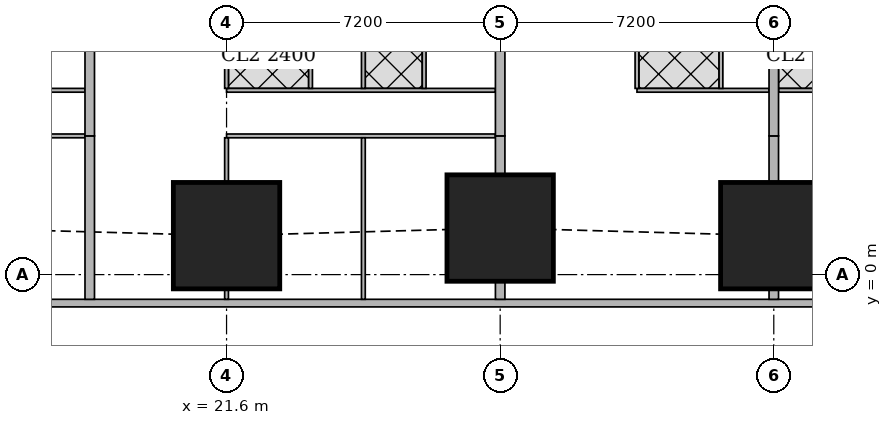
"""IFC4 building model, lengths in metres.
Left out: names, types, materials, properties, quantities, classifications, styles, units other than length and angle.
Written with IfcOpenShell. Run it as: python <this file> out.ifc"""

import sys

from ifc_helpers import new_model, si_unit, direction, frame, frame_2d, origin, origin_2d, place, context, subcontext, project, spatial, rectangle, extrude, element, fill, save


model = new_model("IFC4")
c1 = context("Model", 3, precision=1e-05, world=origin(), true_north=direction((0.0, 1.0)))
c2 = subcontext(c1, "Body", "Model", "MODEL_VIEW")
j1 = project(units=[si_unit("LENGTHUNIT", "METRE"), si_unit("PLANEANGLEUNIT", "RADIAN")], contexts=[c1])
p1 = place(None, origin())
s1 = spatial("IfcSite", under=j1, at=p1, CompositionType="ELEMENT")
p2 = place(p1, origin())
s2 = spatial("IfcBuilding", under=s1, at=p2, CompositionType="ELEMENT")
p3 = place(p2, frame((0.0, 0.0, 53.75)))
s3 = spatial("IfcBuildingStorey", under=s2, at=p3, CompositionType="ELEMENT", Elevation=53.75)
for number, where, z_axis, x_axis in (
    (1, (21.6, 1.025, 0.0), (0.0, 0.0, 1.0), (1.0, 0.0, 0.0)),
    (2, (28.8, 1.225, 0.0), (0.0, 0.0, 1.0), (1.0, 0.0, 0.0)),
    (3, (36.0, 1.025, 0.0), (0.0, 0.0, 1.0), (1.0, 0.0, 0.0)),
):
    element("IfcColumn", number, at=place(p3, frame(where, z_axis=z_axis, x_axis=x_axis)), inside=s3, PredefinedType="COLUMN", context=c2, shape_type="SweptSolid", body=[
        extrude(rectangle(XDim=2.8, YDim=2.8, at=origin_2d()), origin(), (0.0, 0.0, 1.0), 3.75),
    ])
p4 = place(p3, frame((2.163, -0.75, 0.0), z_axis=(0.0, 0.0, 1.0), x_axis=(1.0, 0.0, 0.0)))
e4 = element("IfcWall", 4, at=p4, inside=s3, PredefinedType="SOLIDWALL", context=c2, shape_type="SweptSolid", body=[
    extrude(rectangle(XDim=45.628, YDim=0.2, at=frame_2d((22.814, 0.0))), origin(), (0.0, 0.0, 1.0), 3.5),
])
p5 = place(p4, frame((9.537, 0.0, 0.9)))
e5 = element("IfcOpeningElement", 5, at=p5, cuts=e4, PredefinedType="OPENING", context=c2, shape_type="SweptSolid", body=[
    extrude(rectangle(XDim=1.8, YDim=1.5, at=frame_2d((0.9, 0.75))), frame((0.0, 0.11, 0.0), z_axis=(0.0, -1.0, 0.0), x_axis=(1.0, 0.0, 0.0)), (0.0, 0.0, 1.0), 0.22),
])
p6 = place(p4, frame((13.137, 0.0, 0.9)))
e6 = element("IfcOpeningElement", 6, at=p6, cuts=e4, PredefinedType="OPENING", context=c2, shape_type="SweptSolid", body=[
    extrude(rectangle(XDim=1.8, YDim=1.5, at=frame_2d((0.9, 0.75))), frame((0.0, 0.11, 0.0), z_axis=(0.0, -1.0, 0.0), x_axis=(1.0, 0.0, 0.0)), (0.0, 0.0, 1.0), 0.22),
])
p7 = place(p4, frame((16.737, 0.0, 0.9)))
e7 = element("IfcOpeningElement", 7, at=p7, cuts=e4, PredefinedType="OPENING", context=c2, shape_type="SweptSolid", body=[
    extrude(rectangle(XDim=1.8, YDim=1.5, at=frame_2d((0.9, 0.75))), frame((0.0, 0.11, 0.0), z_axis=(0.0, -1.0, 0.0), x_axis=(1.0, 0.0, 0.0)), (0.0, 0.0, 1.0), 0.22),
])
p8 = place(p4, frame((20.337, 0.0, 0.9)))
e8 = element("IfcOpeningElement", 8, at=p8, cuts=e4, PredefinedType="OPENING", context=c2, shape_type="SweptSolid", body=[
    extrude(rectangle(XDim=1.8, YDim=1.5, at=frame_2d((0.9, 0.75))), frame((0.0, 0.11, 0.0), z_axis=(0.0, -1.0, 0.0), x_axis=(1.0, 0.0, 0.0)), (0.0, 0.0, 1.0), 0.22),
])
p9 = place(p4, frame((23.937, 0.0, 0.9)))
e9 = element("IfcOpeningElement", 9, at=p9, cuts=e4, PredefinedType="OPENING", context=c2, shape_type="SweptSolid", body=[
    extrude(rectangle(XDim=1.8, YDim=1.5, at=frame_2d((0.9, 0.75))), frame((0.0, 0.11, 0.0), z_axis=(0.0, -1.0, 0.0), x_axis=(1.0, 0.0, 0.0)), (0.0, 0.0, 1.0), 0.22),
])
p10 = place(p4, frame((27.537, 0.0, 0.9)))
e10 = element("IfcOpeningElement", 10, at=p10, cuts=e4, PredefinedType="OPENING", context=c2, shape_type="SweptSolid", body=[
    extrude(rectangle(XDim=1.8, YDim=1.5, at=frame_2d((0.9, 0.75))), frame((0.0, 0.11, 0.0), z_axis=(0.0, -1.0, 0.0), x_axis=(1.0, 0.0, 0.0)), (0.0, 0.0, 1.0), 0.22),
])
p11 = place(p4, frame((31.137, 0.0, 0.9)))
e11 = element("IfcOpeningElement", 11, at=p11, cuts=e4, PredefinedType="OPENING", context=c2, shape_type="SweptSolid", body=[
    extrude(rectangle(XDim=1.8, YDim=1.5, at=frame_2d((0.9, 0.75))), frame((0.0, 0.11, 0.0), z_axis=(0.0, -1.0, 0.0), x_axis=(1.0, 0.0, 0.0)), (0.0, 0.0, 1.0), 0.22),
])
p12 = place(p4, frame((34.737, 0.0, 0.9)))
e12 = element("IfcOpeningElement", 12, at=p12, cuts=e4, PredefinedType="OPENING", context=c2, shape_type="SweptSolid", body=[
    extrude(rectangle(XDim=1.8, YDim=1.5, at=frame_2d((0.9, 0.75))), frame((0.0, 0.11, 0.0), z_axis=(0.0, -1.0, 0.0), x_axis=(1.0, 0.0, 0.0)), (0.0, 0.0, 1.0), 0.22),
])
p13 = place(p3, frame((35.094, 36.585, 0.0), z_axis=(0.0, 0.0, 1.0), x_axis=(0.185588860311, -0.982627485331, 0.0)))
e13 = element("IfcWall", 13, at=p13, inside=s3, PredefinedType="SOLIDWALL", context=c2, shape_type="SweptSolid", body=[
    extrude(rectangle(XDim=34.797, YDim=0.15, at=frame_2d((17.399, 0.0))), origin(), (0.0, 0.0, 1.0), 2.5),
])
p14 = place(p13, frame((9.828, 0.0, 0.0)))
e14 = element("IfcOpeningElement", 14, at=p14, cuts=e13, PredefinedType="OPENING", context=c2, shape_type="SweptSolid", body=[
    extrude(rectangle(XDim=1.0, YDim=2.1, at=frame_2d((0.5, 1.05))), frame((0.0, 0.085, 0.0), z_axis=(0.0, -1.0, 0.0), x_axis=(1.0, 0.0, 0.0)), (0.0, 0.0, 1.0), 0.17),
])
p15 = place(p13, frame((13.645, 0.0, 0.0)))
e15 = element("IfcOpeningElement", 15, at=p15, cuts=e13, PredefinedType="OPENING", context=c2, shape_type="SweptSolid", body=[
    extrude(rectangle(XDim=1.0, YDim=2.1, at=frame_2d((0.5, 1.05))), frame((0.0, 0.085, 0.0), z_axis=(0.0, -1.0, 0.0), x_axis=(1.0, 0.0, 0.0)), (0.0, 0.0, 1.0), 0.17),
])
p16 = place(p13, frame((25.9, 0.0, 0.0)))
e16 = element("IfcOpeningElement", 16, at=p16, cuts=e13, PredefinedType="OPENING", context=c2, shape_type="SweptSolid", body=[
    extrude(rectangle(XDim=1.0, YDim=2.1, at=frame_2d((0.5, 1.05))), frame((0.0, 0.085, 0.0), z_axis=(0.0, -1.0, 0.0), x_axis=(1.0, 0.0, 0.0)), (0.0, 0.0, 1.0), 0.17),
])
p17 = place(p3, frame((17.875, 3.65, 0.0), z_axis=(0.0, 0.0, 1.0), x_axis=(-1.0, 0.0, 0.0)))
e17 = element("IfcWall", 17, at=p17, inside=s3, PredefinedType="PARTITIONING", context=c2, shape_type="SweptSolid", body=[
    extrude(rectangle(XDim=3.475, YDim=0.1, at=frame_2d((1.738, 0.0))), origin(), (0.0, 0.0, 1.0), 3.5),
])
p18 = place(p17, frame((1.15, 0.0, 0.0)))
e18 = element("IfcOpeningElement", 18, at=p18, cuts=e17, PredefinedType="OPENING", context=c2, shape_type="SweptSolid", body=[
    extrude(rectangle(XDim=0.9, YDim=2.1, at=frame_2d((0.45, 1.05))), frame((0.0, 0.06, 0.0), z_axis=(0.0, -1.0, 0.0), x_axis=(1.0, 0.0, 0.0)), (0.0, 0.0, 1.0), 0.12),
])
p19 = place(p3, frame((17.875, 4.85, 0.0), z_axis=(0.0, 0.0, 1.0), x_axis=(-1.0, 0.0, 0.0)))
e19 = element("IfcWall", 19, at=p19, inside=s3, PredefinedType="PARTITIONING", context=c2, shape_type="SweptSolid", body=[
    extrude(rectangle(XDim=3.475, YDim=0.1, at=frame_2d((1.738, 0.0))), origin(), (0.0, 0.0, 1.0), 3.5),
])
p20 = place(p19, frame((1.92, 0.0, 0.0)))
e20 = element("IfcOpeningElement", 20, at=p20, cuts=e19, PredefinedType="OPENING", context=c2, shape_type="SweptSolid", body=[
    extrude(rectangle(XDim=0.9, YDim=2.1, at=frame_2d((0.45, 1.05))), frame((0.0, 0.06, 0.0), z_axis=(0.0, -1.0, 0.0), x_axis=(1.0, 0.0, 0.0)), (0.0, 0.0, 1.0), 0.12),
])
p21 = place(p19, frame((0.15, 0.0, 0.0)))
e21 = element("IfcOpeningElement", 21, at=p21, cuts=e19, PredefinedType="OPENING", context=c2, shape_type="SweptSolid", body=[
    extrude(rectangle(XDim=0.9, YDim=2.1, at=frame_2d((0.45, 1.05))), frame((0.0, 0.06, 0.0), z_axis=(0.0, -1.0, 0.0), x_axis=(1.0, 0.0, 0.0)), (0.0, 0.0, 1.0), 0.12),
])
p22 = place(p3, frame((28.675, 3.65, 0.0), z_axis=(0.0, 0.0, 1.0), x_axis=(-1.0, 0.0, 0.0)))
e22 = element("IfcWall", 22, at=p22, inside=s3, PredefinedType="PARTITIONING", context=c2, shape_type="SweptSolid", body=[
    extrude(rectangle(XDim=7.075, YDim=0.1, at=frame_2d((3.538, 0.0))), origin(), (0.0, 0.0, 1.0), 3.5),
])
p23 = place(p22, frame((4.75, 0.0, 0.0)))
e23 = element("IfcOpeningElement", 23, at=p23, cuts=e22, PredefinedType="OPENING", context=c2, shape_type="SweptSolid", body=[
    extrude(rectangle(XDim=0.9, YDim=2.1, at=frame_2d((0.45, 1.05))), frame((0.0, 0.06, 0.0), z_axis=(0.0, -1.0, 0.0), x_axis=(1.0, 0.0, 0.0)), (0.0, 0.0, 1.0), 0.12),
])
p24 = place(p22, frame((2.375, 0.0, 0.0)))
e24 = element("IfcOpeningElement", 24, at=p24, cuts=e22, PredefinedType="OPENING", context=c2, shape_type="SweptSolid", body=[
    extrude(rectangle(XDim=0.9, YDim=2.1, at=frame_2d((0.45, 1.05))), frame((0.0, 0.06, 0.0), z_axis=(0.0, -1.0, 0.0), x_axis=(1.0, 0.0, 0.0)), (0.0, 0.0, 1.0), 0.12),
])
p25 = place(p3, frame((28.675, 4.85, 0.0), z_axis=(0.0, 0.0, 1.0), x_axis=(-1.0, 0.0, 0.0)))
e25 = element("IfcWall", 25, at=p25, inside=s3, PredefinedType="PARTITIONING", context=c2, shape_type="SweptSolid", body=[
    extrude(rectangle(XDim=7.075, YDim=0.1, at=frame_2d((3.538, 0.0))), origin(), (0.0, 0.0, 1.0), 3.5),
])
p26 = place(p25, frame((5.52, 0.0, 0.0)))
e26 = element("IfcOpeningElement", 26, at=p26, cuts=e25, PredefinedType="OPENING", context=c2, shape_type="SweptSolid", body=[
    extrude(rectangle(XDim=0.9, YDim=2.1, at=frame_2d((0.45, 1.05))), frame((0.0, 0.06, 0.0), z_axis=(0.0, -1.0, 0.0), x_axis=(1.0, 0.0, 0.0)), (0.0, 0.0, 1.0), 0.12),
])
p27 = place(p25, frame((2.225, 0.0, 0.0)))
e27 = element("IfcOpeningElement", 27, at=p27, cuts=e25, PredefinedType="OPENING", context=c2, shape_type="SweptSolid", body=[
    extrude(rectangle(XDim=0.9, YDim=2.1, at=frame_2d((0.45, 1.05))), frame((0.0, 0.06, 0.0), z_axis=(0.0, -1.0, 0.0), x_axis=(1.0, 0.0, 0.0)), (0.0, 0.0, 1.0), 0.12),
])
p28 = place(p25, frame((3.72, 0.0, 0.0)))
e28 = element("IfcOpeningElement", 28, at=p28, cuts=e25, PredefinedType="OPENING", context=c2, shape_type="SweptSolid", body=[
    extrude(rectangle(XDim=0.9, YDim=2.1, at=frame_2d((0.45, 1.05))), frame((0.0, 0.06, 0.0), z_axis=(0.0, -1.0, 0.0), x_axis=(1.0, 0.0, 0.0)), (0.0, 0.0, 1.0), 0.12),
])
p29 = place(p25, frame((0.425, 0.0, 0.0)))
e29 = element("IfcOpeningElement", 29, at=p29, cuts=e25, PredefinedType="OPENING", context=c2, shape_type="SweptSolid", body=[
    extrude(rectangle(XDim=0.9, YDim=2.1, at=frame_2d((0.45, 1.05))), frame((0.0, 0.06, 0.0), z_axis=(0.0, -1.0, 0.0), x_axis=(1.0, 0.0, 0.0)), (0.0, 0.0, 1.0), 0.12),
])
p30 = place(p3, frame((21.6, -0.65, 0.0), z_axis=(0.0, 0.0, 1.0), x_axis=(0.0, 1.0, 0.0)))
e30 = element("IfcWall", 30, at=p30, inside=s3, PredefinedType="PARTITIONING", context=c2, shape_type="SweptSolid", body=[
    extrude(rectangle(XDim=0.274, YDim=0.1, at=frame_2d((0.137, 0.0))), origin(), (0.0, 0.0, 1.0), 3.5),
])
p31 = place(p3, frame((21.6, 2.426, 0.0), z_axis=(0.0, 0.0, 1.0), x_axis=(0.0, 1.0, 0.0)))
e31 = element("IfcWall", 31, at=p31, inside=s3, PredefinedType="PARTITIONING", context=c2, shape_type="SweptSolid", body=[
    extrude(rectangle(XDim=1.174, YDim=0.1, at=frame_2d((0.587, 0.0))), origin(), (0.0, 0.0, 1.0), 3.5),
])
p32 = place(p3, frame((25.2, -0.65, 0.0), z_axis=(0.0, 0.0, 1.0), x_axis=(0.0, 1.0, 0.0)))
e32 = element("IfcWall", 32, at=p32, inside=s3, PredefinedType="PARTITIONING", context=c2, shape_type="SweptSolid", body=[
    extrude(rectangle(XDim=4.25, YDim=0.1, at=frame_2d((2.125, 0.0))), origin(), (0.0, 0.0, 1.0), 2.05),
])
p33 = place(p3, frame((21.6, 4.9, 0.0), z_axis=(0.0, 0.0, 1.0), x_axis=(0.0, 1.0, 0.0)))
e33 = element("IfcWall", 33, at=p33, inside=s3, PredefinedType="PARTITIONING", context=c2, shape_type="SweptSolid", body=[
    extrude(rectangle(XDim=1.699, YDim=0.1, at=frame_2d((0.85, 0.0))), origin(), (0.0, 0.0, 1.0), 3.5),
])
for number, where, z_axis, x_axis in (
    (34, (25.2, 4.9, 0.0), (0.0, 0.0, 1.0), (0.0, 1.0, 0.0)),
    (35, (23.81, 4.9, 0.0), (0.0, 0.0, 1.0), (0.0, 1.0, 0.0)),
    (36, (26.8, 4.9, 0.0), (0.0, 0.0, 1.0), (0.0, 1.0, 0.0)),
):
    element("IfcWall", number, at=place(p3, frame(where, z_axis=z_axis, x_axis=x_axis)), inside=s3, PredefinedType="PARTITIONING", context=c2, shape_type="SweptSolid", body=[
        extrude(rectangle(XDim=3.275, YDim=0.1, at=frame_2d((1.638, 0.0))), origin(), (0.0, 0.0, 1.0), 3.5),
    ])
p34 = place(p3, frame((18.0, -0.65, 0.0), z_axis=(0.0, 0.0, 1.0), x_axis=(0.0, 1.0, 0.0)))
e37 = element("IfcWall", 37, at=p34, inside=s3, PredefinedType="SOLIDWALL", context=c2, shape_type="SweptSolid", body=[
    extrude(rectangle(XDim=4.3, YDim=0.25, at=frame_2d((2.15, 0.0))), origin(), (0.0, 0.0, 1.0), 2.05),
])
p35 = place(p3, frame((18.0, 3.65, 0.0), z_axis=(0.0, 0.0, 1.0), x_axis=(0.0, 1.0, 0.0)))
e38 = element("IfcWall", 38, at=p35, inside=s3, PredefinedType="SOLIDWALL", context=c2, shape_type="SweptSolid", body=[
    extrude(rectangle(XDim=4.525, YDim=0.25, at=frame_2d((2.263, 0.0))), origin(), (0.0, 0.0, 1.0), 3.5),
])
p36 = place(p3, frame((35.875, 4.85, 0.0), z_axis=(0.0, 0.0, 1.0), x_axis=(-1.0, 0.0, 0.0)))
e39 = element("IfcWall", 39, at=p36, inside=s3, PredefinedType="PARTITIONING", context=c2, shape_type="SweptSolid", body=[
    extrude(rectangle(XDim=3.475, YDim=0.1, at=frame_2d((1.738, 0.0))), origin(), (0.0, 0.0, 1.0), 3.5),
])
p37 = place(p36, frame((1.92, 0.0, 0.0)))
e40 = element("IfcOpeningElement", 40, at=p37, cuts=e39, PredefinedType="OPENING", context=c2, shape_type="SweptSolid", body=[
    extrude(rectangle(XDim=0.9, YDim=2.1, at=frame_2d((0.45, 1.05))), frame((0.0, 0.06, 0.0), z_axis=(0.0, -1.0, 0.0), x_axis=(1.0, 0.0, 0.0)), (0.0, 0.0, 1.0), 0.12),
])
p38 = place(p36, frame((0.15, 0.0, 0.0)))
e41 = element("IfcOpeningElement", 41, at=p38, cuts=e39, PredefinedType="OPENING", context=c2, shape_type="SweptSolid", body=[
    extrude(rectangle(XDim=0.9, YDim=2.1, at=frame_2d((0.45, 1.05))), frame((0.0, 0.06, 0.0), z_axis=(0.0, -1.0, 0.0), x_axis=(1.0, 0.0, 0.0)), (0.0, 0.0, 1.0), 0.12),
])
for number, where, z_axis, x_axis in (
    (42, (32.4, 4.9, 0.0), (0.0, 0.0, 1.0), (0.0, 1.0, 0.0)),
    (43, (34.61, 4.9, 0.0), (0.0, 0.0, 1.0), (0.0, 1.0, 0.0)),
):
    element("IfcWall", number, at=place(p3, frame(where, z_axis=z_axis, x_axis=x_axis)), inside=s3, PredefinedType="PARTITIONING", context=c2, shape_type="SweptSolid", body=[
        extrude(rectangle(XDim=3.275, YDim=0.1, at=frame_2d((1.638, 0.0))), origin(), (0.0, 0.0, 1.0), 3.5),
    ])
p39 = place(p3, frame((28.8, -0.65, 0.0), z_axis=(0.0, 0.0, 1.0), x_axis=(0.0, 1.0, 0.0)))
e44 = element("IfcWall", 44, at=p39, inside=s3, PredefinedType="SOLIDWALL", context=c2, shape_type="SweptSolid", body=[
    extrude(rectangle(XDim=0.474, YDim=0.25, at=frame_2d((0.237, 0.0))), origin(), (0.0, 0.0, 1.0), 3.5),
])
p40 = place(p3, frame((28.8, 2.626, 0.0), z_axis=(0.0, 0.0, 1.0), x_axis=(0.0, 1.0, 0.0)))
e45 = element("IfcWall", 45, at=p40, inside=s3, PredefinedType="SOLIDWALL", context=c2, shape_type="SweptSolid", body=[
    extrude(rectangle(XDim=1.024, YDim=0.25, at=frame_2d((0.512, 0.0))), origin(), (0.0, 0.0, 1.0), 3.5),
])
p41 = place(p3, frame((28.8, 3.65, 0.0), z_axis=(0.0, 0.0, 1.0), x_axis=(0.0, 1.0, 0.0)))
e46 = element("IfcWall", 46, at=p41, inside=s3, PredefinedType="SOLIDWALL", context=c2, shape_type="SweptSolid", body=[
    extrude(rectangle(XDim=2.949, YDim=0.25, at=frame_2d((1.475, 0.0))), origin(), (0.0, 0.0, 1.0), 3.5),
])
p42 = place(p3, frame((38.029, 4.85, 0.0), z_axis=(0.0, 0.0, 1.0), x_axis=(-1.0, 0.0, 0.0)))
e47 = element("IfcWall", 47, at=p42, inside=s3, PredefinedType="PARTITIONING", context=c2, shape_type="SweptSolid", body=[
    extrude(rectangle(XDim=1.904, YDim=0.1, at=frame_2d((0.952, 0.0))), origin(), (0.0, 0.0, 1.0), 3.5),
])
p43 = place(p42, frame((0.579, 0.0, 0.0)))
e48 = element("IfcOpeningElement", 48, at=p43, cuts=e47, PredefinedType="OPENING", context=c2, shape_type="SweptSolid", body=[
    extrude(rectangle(XDim=0.9, YDim=2.1, at=frame_2d((0.45, 1.05))), frame((0.0, 0.06, 0.0), z_axis=(0.0, -1.0, 0.0), x_axis=(1.0, 0.0, 0.0)), (0.0, 0.0, 1.0), 0.12),
])
p44 = place(p3, frame((36.0, -0.65, 0.0), z_axis=(0.0, 0.0, 1.0), x_axis=(0.0, 1.0, 0.0)))
e49 = element("IfcWall", 49, at=p44, inside=s3, PredefinedType="SOLIDWALL", context=c2, shape_type="SweptSolid", body=[
    extrude(rectangle(XDim=0.274, YDim=0.25, at=frame_2d((0.137, 0.0))), origin(), (0.0, 0.0, 1.0), 3.5),
])
p45 = place(p3, frame((36.0, 2.426, 0.0), z_axis=(0.0, 0.0, 1.0), x_axis=(0.0, 1.0, 0.0)))
e50 = element("IfcWall", 50, at=p45, inside=s3, PredefinedType="SOLIDWALL", context=c2, shape_type="SweptSolid", body=[
    extrude(rectangle(XDim=1.224, YDim=0.25, at=frame_2d((0.612, 0.0))), origin(), (0.0, 0.0, 1.0), 3.5),
])
p46 = place(p3, frame((36.0, 3.65, 0.0), z_axis=(0.0, 0.0, 1.0), x_axis=(0.0, 1.0, 0.0)))
e51 = element("IfcWall", 51, at=p46, inside=s3, PredefinedType="SOLIDWALL", context=c2, shape_type="SweptSolid", body=[
    extrude(rectangle(XDim=2.949, YDim=0.25, at=frame_2d((1.475, 0.0))), origin(), (0.0, 0.0, 1.0), 3.5),
])
p47 = place(p6, origin())
e52 = element("IfcWindow", 52, at=p47, inside=s3, PartitioningType="SINGLE_PANEL", PredefinedType="WINDOW", context=c2, shape_type="SweptSolid", body=[
    extrude(rectangle(XDim=1.8, YDim=1.5, at=frame_2d((0.9, 0.75))), frame((0.0, 0.03, 0.0), z_axis=(0.0, -1.0, 0.0), x_axis=(1.0, 0.0, 0.0)), (0.0, 0.0, 1.0), 0.06),
])
fill(e6, e52)
p48 = place(p7, origin())
e53 = element("IfcWindow", 53, at=p48, inside=s3, PartitioningType="SINGLE_PANEL", PredefinedType="WINDOW", context=c2, shape_type="SweptSolid", body=[
    extrude(rectangle(XDim=1.8, YDim=1.5, at=frame_2d((0.9, 0.75))), frame((0.0, 0.03, 0.0), z_axis=(0.0, -1.0, 0.0), x_axis=(1.0, 0.0, 0.0)), (0.0, 0.0, 1.0), 0.06),
])
fill(e7, e53)
p49 = place(p8, origin())
e54 = element("IfcWindow", 54, at=p49, inside=s3, PartitioningType="SINGLE_PANEL", PredefinedType="WINDOW", context=c2, shape_type="SweptSolid", body=[
    extrude(rectangle(XDim=1.8, YDim=1.5, at=frame_2d((0.9, 0.75))), frame((0.0, 0.03, 0.0), z_axis=(0.0, -1.0, 0.0), x_axis=(1.0, 0.0, 0.0)), (0.0, 0.0, 1.0), 0.06),
])
fill(e8, e54)
p50 = place(p9, origin())
e55 = element("IfcWindow", 55, at=p50, inside=s3, PartitioningType="SINGLE_PANEL", PredefinedType="WINDOW", context=c2, shape_type="SweptSolid", body=[
    extrude(rectangle(XDim=1.8, YDim=1.5, at=frame_2d((0.9, 0.75))), frame((0.0, 0.03, 0.0), z_axis=(0.0, -1.0, 0.0), x_axis=(1.0, 0.0, 0.0)), (0.0, 0.0, 1.0), 0.06),
])
fill(e9, e55)
p51 = place(p10, origin())
e56 = element("IfcWindow", 56, at=p51, inside=s3, PartitioningType="SINGLE_PANEL", PredefinedType="WINDOW", context=c2, shape_type="SweptSolid", body=[
    extrude(rectangle(XDim=1.8, YDim=1.5, at=frame_2d((0.9, 0.75))), frame((0.0, 0.03, 0.0), z_axis=(0.0, -1.0, 0.0), x_axis=(1.0, 0.0, 0.0)), (0.0, 0.0, 1.0), 0.06),
])
fill(e10, e56)
p52 = place(p11, origin())
e57 = element("IfcWindow", 57, at=p52, inside=s3, PartitioningType="SINGLE_PANEL", PredefinedType="WINDOW", context=c2, shape_type="SweptSolid", body=[
    extrude(rectangle(XDim=1.8, YDim=1.5, at=frame_2d((0.9, 0.75))), frame((0.0, 0.03, 0.0), z_axis=(0.0, -1.0, 0.0), x_axis=(1.0, 0.0, 0.0)), (0.0, 0.0, 1.0), 0.06),
])
fill(e11, e57)
p53 = place(p12, origin())
e58 = element("IfcWindow", 58, at=p53, inside=s3, PartitioningType="SINGLE_PANEL", PredefinedType="WINDOW", context=c2, shape_type="SweptSolid", body=[
    extrude(rectangle(XDim=1.8, YDim=1.5, at=frame_2d((0.9, 0.75))), frame((0.0, 0.03, 0.0), z_axis=(0.0, -1.0, 0.0), x_axis=(1.0, 0.0, 0.0)), (0.0, 0.0, 1.0), 0.06),
])
fill(e12, e58)
p54 = place(p21, origin())
e59 = element("IfcDoor", 59, at=p54, inside=s3, OperationType="SINGLE_SWING_RIGHT", PredefinedType="DOOR", context=c2, shape_type="SweptSolid", body=[
    extrude(rectangle(XDim=0.9, YDim=2.1, at=frame_2d((0.45, 1.05))), frame((0.0, 0.025, 0.0), z_axis=(0.0, -1.0, 0.0), x_axis=(1.0, 0.0, 0.0)), (0.0, 0.0, 1.0), 0.05),
])
fill(e21, e59)
p55 = place(p23, origin())
e60 = element("IfcDoor", 60, at=p55, inside=s3, OperationType="SINGLE_SWING_RIGHT", PredefinedType="DOOR", context=c2, shape_type="SweptSolid", body=[
    extrude(rectangle(XDim=0.9, YDim=2.1, at=frame_2d((0.45, 1.05))), frame((0.0, 0.025, 0.0), z_axis=(0.0, -1.0, 0.0), x_axis=(1.0, 0.0, 0.0)), (0.0, 0.0, 1.0), 0.05),
])
fill(e23, e60)
p56 = place(p24, origin())
e61 = element("IfcDoor", 61, at=p56, inside=s3, OperationType="SINGLE_SWING_RIGHT", PredefinedType="DOOR", context=c2, shape_type="SweptSolid", body=[
    extrude(rectangle(XDim=0.9, YDim=2.1, at=frame_2d((0.45, 1.05))), frame((0.0, 0.025, 0.0), z_axis=(0.0, -1.0, 0.0), x_axis=(1.0, 0.0, 0.0)), (0.0, 0.0, 1.0), 0.05),
])
fill(e24, e61)
p57 = place(p26, origin())
e62 = element("IfcDoor", 62, at=p57, inside=s3, OperationType="SINGLE_SWING_LEFT", PredefinedType="DOOR", context=c2, shape_type="SweptSolid", body=[
    extrude(rectangle(XDim=0.9, YDim=2.1, at=frame_2d((0.45, 1.05))), frame((0.0, 0.025, 0.0), z_axis=(0.0, -1.0, 0.0), x_axis=(1.0, 0.0, 0.0)), (0.0, 0.0, 1.0), 0.05),
])
fill(e26, e62)
p58 = place(p27, origin())
e63 = element("IfcDoor", 63, at=p58, inside=s3, OperationType="SINGLE_SWING_LEFT", PredefinedType="DOOR", context=c2, shape_type="SweptSolid", body=[
    extrude(rectangle(XDim=0.9, YDim=2.1, at=frame_2d((0.45, 1.05))), frame((0.0, 0.025, 0.0), z_axis=(0.0, -1.0, 0.0), x_axis=(1.0, 0.0, 0.0)), (0.0, 0.0, 1.0), 0.05),
])
fill(e27, e63)
p59 = place(p28, origin())
e64 = element("IfcDoor", 64, at=p59, inside=s3, OperationType="SINGLE_SWING_LEFT", PredefinedType="DOOR", context=c2, shape_type="SweptSolid", body=[
    extrude(rectangle(XDim=0.9, YDim=2.1, at=frame_2d((0.45, 1.05))), frame((0.0, 0.025, 0.0), z_axis=(0.0, -1.0, 0.0), x_axis=(1.0, 0.0, 0.0)), (0.0, 0.0, 1.0), 0.05),
])
fill(e28, e64)
p60 = place(p29, origin())
e65 = element("IfcDoor", 65, at=p60, inside=s3, OperationType="SINGLE_SWING_RIGHT", PredefinedType="DOOR", context=c2, shape_type="SweptSolid", body=[
    extrude(rectangle(XDim=0.9, YDim=2.1, at=frame_2d((0.45, 1.05))), frame((0.0, 0.025, 0.0), z_axis=(0.0, -1.0, 0.0), x_axis=(1.0, 0.0, 0.0)), (0.0, 0.0, 1.0), 0.05),
])
fill(e29, e65)
p61 = place(p37, origin())
e66 = element("IfcDoor", 66, at=p61, inside=s3, OperationType="SINGLE_SWING_LEFT", PredefinedType="DOOR", context=c2, shape_type="SweptSolid", body=[
    extrude(rectangle(XDim=0.9, YDim=2.1, at=frame_2d((0.45, 1.05))), frame((0.0, 0.025, 0.0), z_axis=(0.0, -1.0, 0.0), x_axis=(1.0, 0.0, 0.0)), (0.0, 0.0, 1.0), 0.05),
])
fill(e40, e66)
p62 = place(p38, origin())
e67 = element("IfcDoor", 67, at=p62, inside=s3, OperationType="SINGLE_SWING_RIGHT", PredefinedType="DOOR", context=c2, shape_type="SweptSolid", body=[
    extrude(rectangle(XDim=0.9, YDim=2.1, at=frame_2d((0.45, 1.05))), frame((0.0, 0.025, 0.0), z_axis=(0.0, -1.0, 0.0), x_axis=(1.0, 0.0, 0.0)), (0.0, 0.0, 1.0), 0.05),
])
fill(e41, e67)
p63 = place(p43, origin())
e68 = element("IfcDoor", 68, at=p63, inside=s3, OperationType="SINGLE_SWING_LEFT", PredefinedType="DOOR", context=c2, shape_type="SweptSolid", body=[
    extrude(rectangle(XDim=0.9, YDim=2.1, at=frame_2d((0.45, 1.05))), frame((0.0, 0.025, 0.0), z_axis=(0.0, -1.0, 0.0), x_axis=(1.0, 0.0, 0.0)), (0.0, 0.0, 1.0), 0.05),
])
fill(e48, e68)
save(model, sys.argv[1])
